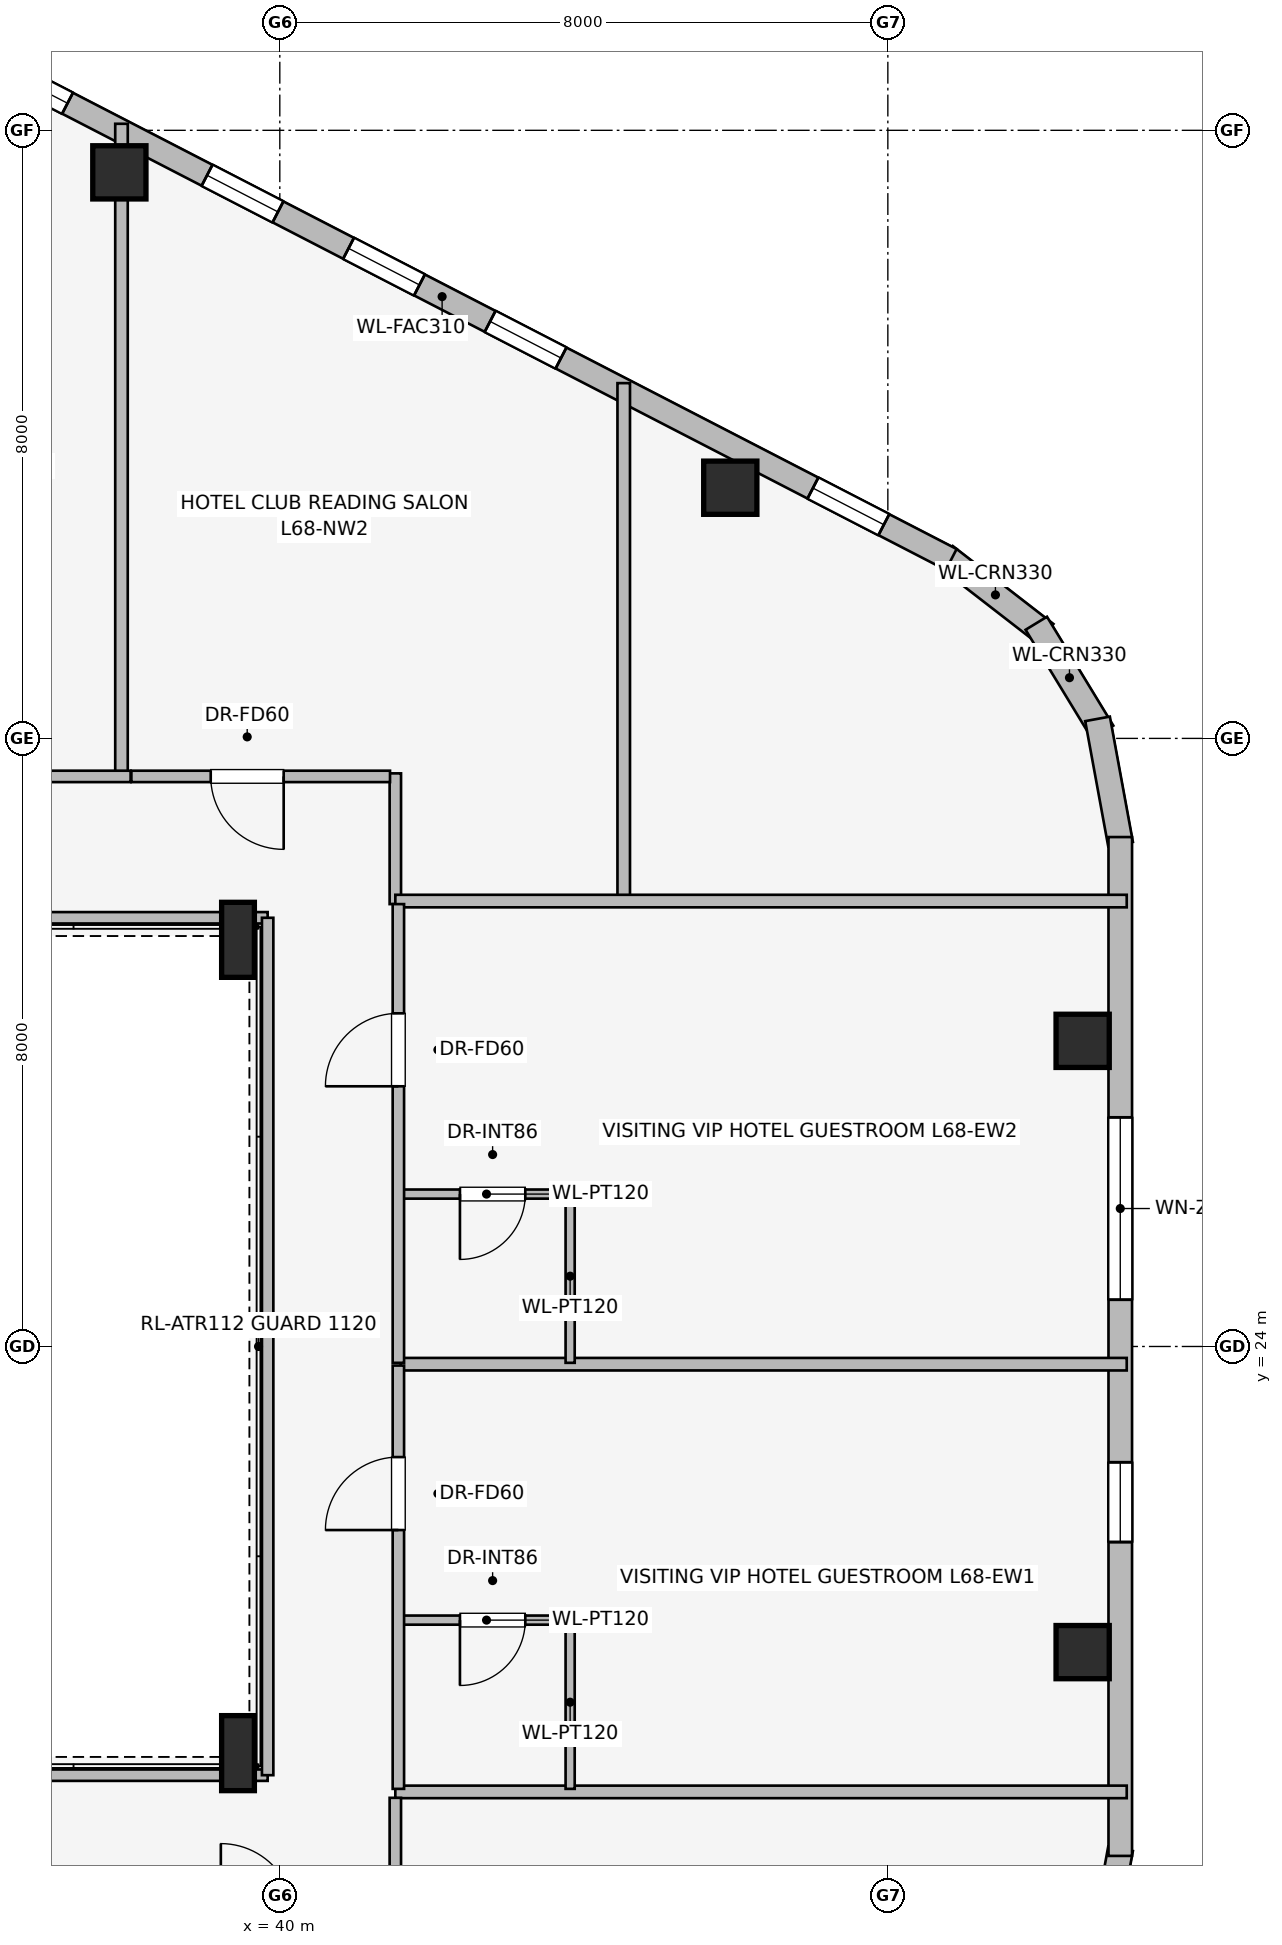
"""IFC4 building model, lengths in metres.
Left out: names, types, materials, properties, quantities, classifications, styles, units other than length and angle.
Written with IfcOpenShell. Run it as: python <this file> out.ifc"""

import sys

from ifc_helpers import new_model, si_unit, direction, frame, frame_2d, origin, origin_2d, place, context, subcontext, project, spatial, rectangle, i_section, extrude, element, fill, save


model = new_model("IFC4")
c1 = context("Model", 3, precision=1e-05, world=origin(), true_north=direction((0.0, 1.0)))
c2 = subcontext(c1, "Body", "Model", "MODEL_VIEW")
j1 = project(units=[si_unit("LENGTHUNIT", "METRE"), si_unit("PLANEANGLEUNIT", "RADIAN")], contexts=[c1])
p1 = place(None, origin())
s1 = spatial("IfcSite", under=j1, at=p1, CompositionType="ELEMENT")
p2 = place(p1, origin())
s2 = spatial("IfcBuilding", under=s1, at=p2, CompositionType="ELEMENT")
p3 = place(p2, frame((0.0, 0.0, 249.0)))
s3 = spatial("IfcBuildingStorey", under=s2, at=p3, CompositionType="ELEMENT", Elevation=249.0)
for number, where, z_axis, x_axis in (
    (1, (45.927, 35.298, 0.0), (0.0, 0.0, 1.0), (1.0, 0.0, 0.0)),
    (2, (37.889, 39.447, 0.0), (0.0, 0.0, 1.0), (1.0, 0.0, 0.0)),
    (3, (50.563, 19.979, 0.0), (0.0, 0.0, 1.0), (1.0, 0.0, 0.0)),
    (4, (50.563, 28.021, 0.0), (0.0, 0.0, 1.0), (1.0, 0.0, 0.0)),
):
    element("IfcColumn", number, at=place(p3, frame(where, z_axis=z_axis, x_axis=x_axis)), inside=s3, PredefinedType="COLUMN", context=c2, shape_type="SweptSolid", body=[
        extrude(rectangle(XDim=0.7, YDim=0.7, at=origin_2d()), origin(), (0.0, 0.0, 1.0), 3.55),
    ])
for number, where, z_axis, x_axis in (
    (5, (39.45, 18.65, 0.0), (0.0, 0.0, 1.0), (1.0, 0.0, 0.0)),
    (6, (39.45, 29.35, 0.0), (0.0, 0.0, 1.0), (1.0, 0.0, 0.0)),
):
    element("IfcColumn", number, at=place(p3, frame(where, z_axis=z_axis, x_axis=x_axis)), inside=s3, PredefinedType="COLUMN", context=c2, shape_type="SweptSolid", body=[
        extrude(i_section(OverallWidth=0.431, OverallDepth=0.987, WebThickness=0.034, FlangeThickness=0.062, at=origin_2d()), origin(), (0.0, 0.0, 1.0), 3.55),
    ])
p4 = place(p3, frame((48.753, 34.401, 0.0), z_axis=(0.0, 0.0, 1.0), x_axis=(0.790691856293, -0.61221433207, 0.0)))
e7 = element("IfcWall", 7, at=p4, inside=s3, PredefinedType="STANDARD", context=c2, shape_type="SweptSolid", body=[
    extrude(rectangle(XDim=1.676, YDim=0.33, at=frame_2d((0.838, 0.0))), origin(), (0.0, 0.0, 1.0), 3.29),
])
p5 = place(p3, frame((49.953, 33.515, 0.0), z_axis=(0.0, 0.0, 1.0), x_axis=(0.520325409202, -0.853968072318, 0.0)))
e8 = element("IfcWall", 8, at=p5, inside=s3, PredefinedType="STANDARD", context=c2, shape_type="SweptSolid", body=[
    extrude(rectangle(XDim=1.678, YDim=0.33, at=frame_2d((0.839, 0.0))), origin(), (0.0, 0.0, 1.0), 3.29),
])
p6 = place(p3, frame((50.759, 32.257, 0.0), z_axis=(0.0, 0.0, 1.0), x_axis=(0.180691763044, -0.983539773862, 0.0)))
e9 = element("IfcWall", 9, at=p6, inside=s3, PredefinedType="STANDARD", context=c2, shape_type="SweptSolid", body=[
    extrude(rectangle(XDim=1.677, YDim=0.33, at=frame_2d((0.838, 0.0))), origin(), (0.0, 0.0, 1.0), 3.29),
])
p7 = place(p3, frame((35.437, 41.27, 0.0), z_axis=(0.0, 0.0, 1.0), x_axis=(0.888581481622, -0.458718814218, 0.0)))
e10 = element("IfcWall", 10, at=p7, inside=s3, PredefinedType="STANDARD", context=c2, shape_type="SweptSolid", body=[
    extrude(rectangle(XDim=15.077, YDim=0.31, at=frame_2d((7.539, 0.0))), origin(), (0.0, 0.0, 1.0), 3.29),
])
p8 = place(p7, frame((0.942, 0.0, 0.75)))
e11 = element("IfcOpeningElement", 11, at=p8, cuts=e10, PredefinedType="OPENING", context=c2, shape_type="SweptSolid", body=[
    extrude(rectangle(XDim=1.05, YDim=1.4, at=frame_2d((0.525, 0.7))), frame((0.0, 0.165, 0.0), z_axis=(0.0, -1.0, 0.0), x_axis=(1.0, 0.0, 0.0)), (0.0, 0.0, 1.0), 0.33),
])
p9 = place(p7, frame((4.058, 0.0, 0.75)))
e12 = element("IfcOpeningElement", 12, at=p9, cuts=e10, PredefinedType="OPENING", context=c2, shape_type="SweptSolid", body=[
    extrude(rectangle(XDim=1.05, YDim=1.4, at=frame_2d((0.525, 0.7))), frame((0.0, 0.165, 0.0), z_axis=(0.0, -1.0, 0.0), x_axis=(1.0, 0.0, 0.0)), (0.0, 0.0, 1.0), 0.33),
])
p10 = place(p7, frame((6.153, 0.0, 0.75)))
e13 = element("IfcOpeningElement", 13, at=p10, cuts=e10, PredefinedType="OPENING", context=c2, shape_type="SweptSolid", body=[
    extrude(rectangle(XDim=1.05, YDim=1.4, at=frame_2d((0.525, 0.7))), frame((0.0, 0.165, 0.0), z_axis=(0.0, -1.0, 0.0), x_axis=(1.0, 0.0, 0.0)), (0.0, 0.0, 1.0), 0.33),
])
p11 = place(p7, frame((8.249, 0.0, 0.75)))
e14 = element("IfcOpeningElement", 14, at=p11, cuts=e10, PredefinedType="OPENING", context=c2, shape_type="SweptSolid", body=[
    extrude(rectangle(XDim=1.05, YDim=1.4, at=frame_2d((0.525, 0.7))), frame((0.0, 0.165, 0.0), z_axis=(0.0, -1.0, 0.0), x_axis=(1.0, 0.0, 0.0)), (0.0, 0.0, 1.0), 0.33),
])
p12 = place(p7, frame((13.029, 0.0, 0.75)))
e15 = element("IfcOpeningElement", 15, at=p12, cuts=e10, PredefinedType="OPENING", context=c2, shape_type="SweptSolid", body=[
    extrude(rectangle(XDim=1.05, YDim=1.4, at=frame_2d((0.525, 0.7))), frame((0.0, 0.165, 0.0), z_axis=(0.0, -1.0, 0.0), x_axis=(1.0, 0.0, 0.0)), (0.0, 0.0, 1.0), 0.33),
])
p13 = place(p3, frame((51.062, 17.392, 0.0), z_axis=(0.0, 0.0, 1.0), x_axis=(-0.180691763044, -0.983539773862, 0.0)))
e16 = element("IfcWall", 16, at=p13, inside=s3, PredefinedType="STANDARD", context=c2, shape_type="SweptSolid", body=[
    extrude(rectangle(XDim=1.677, YDim=0.33, at=frame_2d((0.838, 0.0))), origin(), (0.0, 0.0, 1.0), 3.29),
])
p14 = place(p3, frame((51.058, 30.702, 0.0), z_axis=(0.0, 0.0, 1.0), x_axis=(0.0, -1.0, 0.0)))
e17 = element("IfcWall", 17, at=p14, inside=s3, PredefinedType="STANDARD", context=c2, shape_type="SweptSolid", body=[
    extrude(rectangle(XDim=13.404, YDim=0.31, at=frame_2d((6.702, 0.0))), origin(), (0.0, 0.0, 1.0), 3.29),
])
p15 = place(p14, frame((3.687, 0.0, 0.75)))
e18 = element("IfcOpeningElement", 18, at=p15, cuts=e17, PredefinedType="OPENING", context=c2, shape_type="SweptSolid", body=[
    extrude(rectangle(XDim=2.4, YDim=1.6, at=frame_2d((1.2, 0.8))), frame((0.0, 0.165, 0.0), z_axis=(0.0, -1.0, 0.0), x_axis=(1.0, 0.0, 0.0)), (0.0, 0.0, 1.0), 0.33),
])
p16 = place(p14, frame((8.225, 0.0, 0.75)))
e19 = element("IfcOpeningElement", 19, at=p16, cuts=e17, PredefinedType="OPENING", context=c2, shape_type="SweptSolid", body=[
    extrude(rectangle(XDim=1.05, YDim=1.4, at=frame_2d((0.525, 0.7))), frame((0.0, 0.165, 0.0), z_axis=(0.0, -1.0, 0.0), x_axis=(1.0, 0.0, 0.0)), (0.0, 0.0, 1.0), 0.33),
])
p17 = place(p3, frame((27.675, 18.36, 0.0), z_axis=(0.0, 0.0, 1.0), x_axis=(1.0, 0.0, 0.0)))
e20 = element("IfcWall", 20, at=p17, inside=s3, PredefinedType="PARTITIONING", context=c2, shape_type="SweptSolid", body=[
    extrude(rectangle(XDim=12.165, YDim=0.15, at=frame_2d((6.083, 0.0))), origin(), (0.0, 0.0, 1.0), 2.431),
])
p18 = place(p3, frame((39.84, 29.64, 0.0), z_axis=(0.0, 0.0, 1.0), x_axis=(-1.0, 0.0, 0.0)))
e21 = element("IfcWall", 21, at=p18, inside=s3, PredefinedType="PARTITIONING", context=c2, shape_type="SweptSolid", body=[
    extrude(rectangle(XDim=12.203, YDim=0.15, at=frame_2d((6.102, 0.0))), origin(), (0.0, 0.0, 1.0), 2.431),
])
p19 = place(p3, frame((39.84, 18.36, 0.0), z_axis=(0.0, 0.0, 1.0), x_axis=(0.0, 1.0, 0.0)))
e22 = element("IfcWall", 22, at=p19, inside=s3, PredefinedType="PARTITIONING", context=c2, shape_type="SweptSolid", body=[
    extrude(rectangle(XDim=11.28, YDim=0.15, at=frame_2d((5.64, 0.0))), origin(), (0.0, 0.0, 1.0), 3.29),
])
p20 = place(p3, frame((41.52, 29.82, 0.0), z_axis=(0.0, 0.0, 1.0), x_axis=(0.0, 1.0, 0.0)))
e23 = element("IfcWall", 23, at=p20, inside=s3, PredefinedType="PARTITIONING", context=c2, shape_type="SweptSolid", body=[
    extrude(rectangle(XDim=1.72, YDim=0.15, at=frame_2d((0.86, 0.0))), origin(), (0.0, 0.0, 1.0), 3.29),
])
p21 = place(p3, frame((37.917, 31.51, 0.0), z_axis=(0.0, 0.0, 1.0), x_axis=(0.0, 1.0, 0.0)))
e24 = element("IfcWall", 24, at=p21, inside=s3, PredefinedType="PARTITIONING", context=c2, shape_type="SweptSolid", body=[
    extrude(rectangle(XDim=8.576, YDim=0.165, at=frame_2d((4.288, 0.0))), origin(), (0.0, 0.0, 1.0), 2.679),
])
p22 = place(p3, frame((44.525, 29.89, 0.0), z_axis=(0.0, 0.0, 1.0), x_axis=(0.0, 1.0, 0.0)))
e25 = element("IfcWall", 25, at=p22, inside=s3, PredefinedType="PARTITIONING", context=c2, shape_type="SweptSolid", body=[
    extrude(rectangle(XDim=6.784, YDim=0.165, at=frame_2d((3.392, 0.0))), origin(), (0.0, 0.0, 1.0), 3.29),
])
p23 = place(p3, frame((38.037, 31.5, 0.0), z_axis=(0.0, 0.0, 1.0), x_axis=(-1.0, 0.0, 0.0)))
e26 = element("IfcWall", 26, at=p23, inside=s3, PredefinedType="PARTITIONING", context=c2, shape_type="SweptSolid", body=[
    extrude(rectangle(XDim=3.747, YDim=0.15, at=frame_2d((1.874, 0.0))), origin(), (0.0, 0.0, 1.0), 3.29),
])
p24 = place(p23, frame((1.337, 0.0, 0.0)))
e27 = element("IfcOpeningElement", 27, at=p24, cuts=e26, PredefinedType="OPENING", context=c2, shape_type="SweptSolid", body=[
    extrude(rectangle(XDim=0.96, YDim=2.0, at=frame_2d((0.48, 1.0))), frame((0.0, 0.085, 0.0), z_axis=(0.0, -1.0, 0.0), x_axis=(1.0, 0.0, 0.0)), (0.0, 0.0, 1.0), 0.17),
])
p25 = place(p3, frame((41.45, 31.5, 0.0), z_axis=(0.0, 0.0, 1.0), x_axis=(-1.0, 0.0, 0.0)))
e28 = element("IfcWall", 28, at=p25, inside=s3, PredefinedType="PARTITIONING", context=c2, shape_type="SweptSolid", body=[
    extrude(rectangle(XDim=3.403, YDim=0.15, at=frame_2d((1.701, 0.0))), origin(), (0.0, 0.0, 1.0), 3.29),
])
p26 = place(p25, frame((1.399, 0.0, 0.0)))
e29 = element("IfcOpeningElement", 29, at=p26, cuts=e28, PredefinedType="OPENING", context=c2, shape_type="SweptSolid", body=[
    extrude(rectangle(XDim=0.96, YDim=2.0, at=frame_2d((0.48, 1.0))), frame((0.0, 0.085, 0.0), z_axis=(0.0, -1.0, 0.0), x_axis=(1.0, 0.0, 0.0)), (0.0, 0.0, 1.0), 0.17),
])
for number, where, z_axis, x_axis in (
    (30, (41.52, 18.14, 0.0), (0.0, 0.0, 1.0), (1.0, 0.0, 0.0)),
    (31, (41.52, 29.86, 0.0), (0.0, 0.0, 1.0), (1.0, 0.0, 0.0)),
):
    element("IfcWall", number, at=place(p3, frame(where, z_axis=z_axis, x_axis=x_axis)), inside=s3, PredefinedType="PARTITIONING", context=c2, shape_type="SweptSolid", body=[
        extrude(rectangle(XDim=9.623, YDim=0.165, at=frame_2d((4.812, 0.0))), origin(), (0.0, 0.0, 1.0), 3.29),
    ])
p27 = place(p3, frame((41.59, 23.767, 0.0), z_axis=(0.0, 0.0, 1.0), x_axis=(1.0, 0.0, 0.0)))
e32 = element("IfcWall", 32, at=p27, inside=s3, PredefinedType="PARTITIONING", context=c2, shape_type="SweptSolid", body=[
    extrude(rectangle(XDim=9.553, YDim=0.165, at=frame_2d((4.776, 0.0))), origin(), (0.0, 0.0, 1.0), 3.29),
])
p28 = place(p3, frame((43.82, 18.18, 0.0), z_axis=(0.0, 0.0, 1.0), x_axis=(0.0, 1.0, 0.0)))
e33 = element("IfcWall", 33, at=p28, inside=s3, PredefinedType="PARTITIONING", context=c2, shape_type="SweptSolid", body=[
    extrude(rectangle(XDim=2.28, YDim=0.12, at=frame_2d((1.14, 0.0))), origin(), (0.0, 0.0, 1.0), 2.887),
])
p29 = place(p3, frame((43.88, 20.4, 0.0), z_axis=(0.0, 0.0, 1.0), x_axis=(-1.0, 0.0, 0.0)))
e34 = element("IfcWall", 34, at=p29, inside=s3, PredefinedType="PARTITIONING", context=c2, shape_type="SweptSolid", body=[
    extrude(rectangle(XDim=2.32, YDim=0.12, at=frame_2d((1.16, 0.0))), origin(), (0.0, 0.0, 1.0), 3.29),
])
p30 = place(p29, frame((0.65, 0.0, 0.0)))
e35 = element("IfcOpeningElement", 35, at=p30, cuts=e34, PredefinedType="OPENING", context=c2, shape_type="SweptSolid", body=[
    extrude(rectangle(XDim=0.86, YDim=2.0, at=frame_2d((0.43, 1.0))), frame((0.0, 0.07, 0.0), z_axis=(0.0, -1.0, 0.0), x_axis=(1.0, 0.0, 0.0)), (0.0, 0.0, 1.0), 0.14),
])
p31 = place(p3, frame((41.56, 18.18, 0.0), z_axis=(0.0, 0.0, 1.0), x_axis=(0.0, 1.0, 0.0)))
e36 = element("IfcWall", 36, at=p31, inside=s3, PredefinedType="PARTITIONING", context=c2, shape_type="SweptSolid", body=[
    extrude(rectangle(XDim=5.569, YDim=0.15, at=frame_2d((2.785, 0.0))), origin(), (0.0, 0.0, 1.0), 3.29),
])
p32 = place(p31, frame((3.405, 0.0, 0.0)))
e37 = element("IfcOpeningElement", 37, at=p32, cuts=e36, PredefinedType="OPENING", context=c2, shape_type="SweptSolid", body=[
    extrude(rectangle(XDim=0.96, YDim=2.0, at=frame_2d((0.48, 1.0))), frame((0.0, 0.085, 0.0), z_axis=(0.0, -1.0, 0.0), x_axis=(1.0, 0.0, 0.0)), (0.0, 0.0, 1.0), 0.17),
])
p33 = place(p3, frame((43.82, 23.785, 0.0), z_axis=(0.0, 0.0, 1.0), x_axis=(0.0, 1.0, 0.0)))
e38 = element("IfcWall", 38, at=p33, inside=s3, PredefinedType="PARTITIONING", context=c2, shape_type="SweptSolid", body=[
    extrude(rectangle(XDim=2.28, YDim=0.12, at=frame_2d((1.14, 0.0))), origin(), (0.0, 0.0, 1.0), 2.887),
])
p34 = place(p3, frame((43.88, 26.005, 0.0), z_axis=(0.0, 0.0, 1.0), x_axis=(-1.0, 0.0, 0.0)))
e39 = element("IfcWall", 39, at=p34, inside=s3, PredefinedType="PARTITIONING", context=c2, shape_type="SweptSolid", body=[
    extrude(rectangle(XDim=2.32, YDim=0.12, at=frame_2d((1.16, 0.0))), origin(), (0.0, 0.0, 1.0), 3.29),
])
p35 = place(p34, frame((0.65, 0.0, 0.0)))
e40 = element("IfcOpeningElement", 40, at=p35, cuts=e39, PredefinedType="OPENING", context=c2, shape_type="SweptSolid", body=[
    extrude(rectangle(XDim=0.86, YDim=2.0, at=frame_2d((0.43, 1.0))), frame((0.0, 0.07, 0.0), z_axis=(0.0, -1.0, 0.0), x_axis=(1.0, 0.0, 0.0)), (0.0, 0.0, 1.0), 0.14),
])
p36 = place(p3, frame((41.56, 23.785, 0.0), z_axis=(0.0, 0.0, 1.0), x_axis=(0.0, 1.0, 0.0)))
e41 = element("IfcWall", 41, at=p36, inside=s3, PredefinedType="PARTITIONING", context=c2, shape_type="SweptSolid", body=[
    extrude(rectangle(XDim=6.035, YDim=0.15, at=frame_2d((3.018, 0.0))), origin(), (0.0, 0.0, 1.0), 3.29),
])
p37 = place(p36, frame((3.638, 0.0, 0.0)))
e42 = element("IfcOpeningElement", 42, at=p37, cuts=e41, PredefinedType="OPENING", context=c2, shape_type="SweptSolid", body=[
    extrude(rectangle(XDim=0.96, YDim=2.0, at=frame_2d((0.48, 1.0))), frame((0.0, 0.085, 0.0), z_axis=(0.0, -1.0, 0.0), x_axis=(1.0, 0.0, 0.0)), (0.0, 0.0, 1.0), 0.17),
])
p38 = place(p3, frame((41.52, 16.46, 0.0), z_axis=(0.0, 0.0, 1.0), x_axis=(0.0, 1.0, 0.0)))
e43 = element("IfcWall", 43, at=p38, inside=s3, PredefinedType="PARTITIONING", context=c2, shape_type="SweptSolid", body=[
    extrude(rectangle(XDim=1.602, YDim=0.15, at=frame_2d((0.801, 0.0))), origin(), (0.0, 0.0, 1.0), 3.29),
])
p39 = place(p8, origin())
e44 = element("IfcWindow", 44, at=p39, inside=s3, PartitioningType="SINGLE_PANEL", PredefinedType="WINDOW", context=c2, shape_type="SweptSolid", body=[
    extrude(rectangle(XDim=1.05, YDim=1.4, at=frame_2d((0.525, 0.7))), frame((0.0, 0.03, 0.0), z_axis=(0.0, -1.0, 0.0), x_axis=(1.0, 0.0, 0.0)), (0.0, 0.0, 1.0), 0.06),
])
fill(e11, e44)
p40 = place(p9, origin())
e45 = element("IfcWindow", 45, at=p40, inside=s3, PartitioningType="SINGLE_PANEL", PredefinedType="WINDOW", context=c2, shape_type="SweptSolid", body=[
    extrude(rectangle(XDim=1.05, YDim=1.4, at=frame_2d((0.525, 0.7))), frame((0.0, 0.03, 0.0), z_axis=(0.0, -1.0, 0.0), x_axis=(1.0, 0.0, 0.0)), (0.0, 0.0, 1.0), 0.06),
])
fill(e12, e45)
p41 = place(p10, origin())
e46 = element("IfcWindow", 46, at=p41, inside=s3, PartitioningType="SINGLE_PANEL", PredefinedType="WINDOW", context=c2, shape_type="SweptSolid", body=[
    extrude(rectangle(XDim=1.05, YDim=1.4, at=frame_2d((0.525, 0.7))), frame((0.0, 0.03, 0.0), z_axis=(0.0, -1.0, 0.0), x_axis=(1.0, 0.0, 0.0)), (0.0, 0.0, 1.0), 0.06),
])
fill(e13, e46)
p42 = place(p11, origin())
e47 = element("IfcWindow", 47, at=p42, inside=s3, PartitioningType="SINGLE_PANEL", PredefinedType="WINDOW", context=c2, shape_type="SweptSolid", body=[
    extrude(rectangle(XDim=1.05, YDim=1.4, at=frame_2d((0.525, 0.7))), frame((0.0, 0.03, 0.0), z_axis=(0.0, -1.0, 0.0), x_axis=(1.0, 0.0, 0.0)), (0.0, 0.0, 1.0), 0.06),
])
fill(e14, e47)
p43 = place(p12, origin())
e48 = element("IfcWindow", 48, at=p43, inside=s3, PartitioningType="SINGLE_PANEL", PredefinedType="WINDOW", context=c2, shape_type="SweptSolid", body=[
    extrude(rectangle(XDim=1.05, YDim=1.4, at=frame_2d((0.525, 0.7))), frame((0.0, 0.03, 0.0), z_axis=(0.0, -1.0, 0.0), x_axis=(1.0, 0.0, 0.0)), (0.0, 0.0, 1.0), 0.06),
])
fill(e15, e48)
p44 = place(p15, origin())
e49 = element("IfcWindow", 49, at=p44, inside=s3, PartitioningType="SINGLE_PANEL", PredefinedType="WINDOW", context=c2, shape_type="SweptSolid", body=[
    extrude(rectangle(XDim=2.4, YDim=1.6, at=frame_2d((1.2, 0.8))), frame((0.0, 0.03, 0.0), z_axis=(0.0, -1.0, 0.0), x_axis=(1.0, 0.0, 0.0)), (0.0, 0.0, 1.0), 0.06),
])
fill(e18, e49)
p45 = place(p16, origin())
e50 = element("IfcWindow", 50, at=p45, inside=s3, PartitioningType="SINGLE_PANEL", PredefinedType="WINDOW", context=c2, shape_type="SweptSolid", body=[
    extrude(rectangle(XDim=1.05, YDim=1.4, at=frame_2d((0.525, 0.7))), frame((0.0, 0.03, 0.0), z_axis=(0.0, -1.0, 0.0), x_axis=(1.0, 0.0, 0.0)), (0.0, 0.0, 1.0), 0.06),
])
fill(e19, e50)
p46 = place(p26, origin())
e51 = element("IfcDoor", 51, at=p46, inside=s3, OperationType="SINGLE_SWING_LEFT", PredefinedType="DOOR", context=c2, shape_type="SweptSolid", body=[
    extrude(rectangle(XDim=0.96, YDim=2.0, at=frame_2d((0.48, 1.0))), frame((0.0, 0.025, 0.0), z_axis=(0.0, -1.0, 0.0), x_axis=(1.0, 0.0, 0.0)), (0.0, 0.0, 1.0), 0.05),
])
fill(e29, e51)
p47 = place(p30, origin())
e52 = element("IfcDoor", 52, at=p47, inside=s3, OperationType="SINGLE_SWING_RIGHT", PredefinedType="DOOR", context=c2, shape_type="SweptSolid", body=[
    extrude(rectangle(XDim=0.86, YDim=2.0, at=frame_2d((0.43, 1.0))), frame((0.0, 0.025, 0.0), z_axis=(0.0, -1.0, 0.0), x_axis=(1.0, 0.0, 0.0)), (0.0, 0.0, 1.0), 0.05),
])
fill(e35, e52)
p48 = place(p32, origin())
e53 = element("IfcDoor", 53, at=p48, inside=s3, OperationType="SINGLE_SWING_LEFT", PredefinedType="DOOR", context=c2, shape_type="SweptSolid", body=[
    extrude(rectangle(XDim=0.96, YDim=2.0, at=frame_2d((0.48, 1.0))), frame((0.0, 0.025, 0.0), z_axis=(0.0, -1.0, 0.0), x_axis=(1.0, 0.0, 0.0)), (0.0, 0.0, 1.0), 0.05),
])
fill(e37, e53)
p49 = place(p35, origin())
e54 = element("IfcDoor", 54, at=p49, inside=s3, OperationType="SINGLE_SWING_RIGHT", PredefinedType="DOOR", context=c2, shape_type="SweptSolid", body=[
    extrude(rectangle(XDim=0.86, YDim=2.0, at=frame_2d((0.43, 1.0))), frame((0.0, 0.025, 0.0), z_axis=(0.0, -1.0, 0.0), x_axis=(1.0, 0.0, 0.0)), (0.0, 0.0, 1.0), 0.05),
])
fill(e40, e54)
p50 = place(p37, origin())
e55 = element("IfcDoor", 55, at=p50, inside=s3, OperationType="SINGLE_SWING_LEFT", PredefinedType="DOOR", context=c2, shape_type="SweptSolid", body=[
    extrude(rectangle(XDim=0.96, YDim=2.0, at=frame_2d((0.48, 1.0))), frame((0.0, 0.025, 0.0), z_axis=(0.0, -1.0, 0.0), x_axis=(1.0, 0.0, 0.0)), (0.0, 0.0, 1.0), 0.05),
])
fill(e42, e55)
save(model, sys.argv[1])
